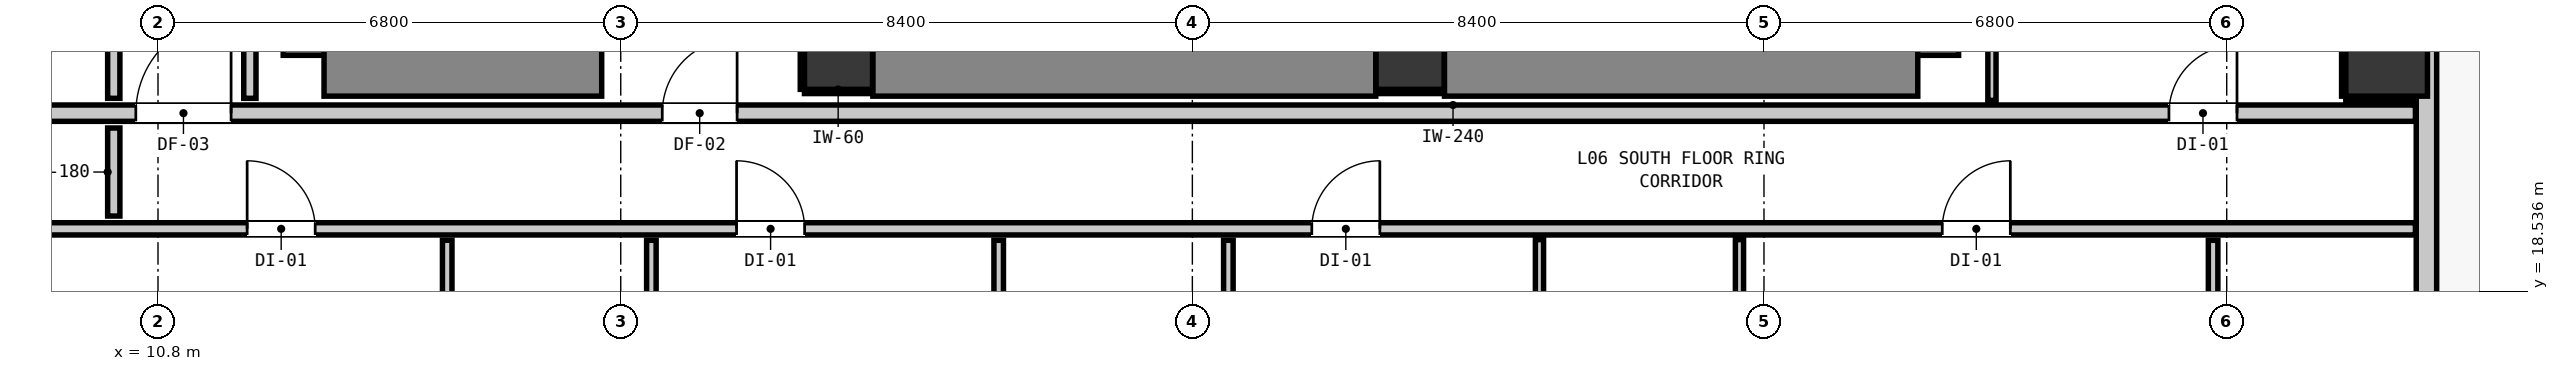
"""IFC4 building model, lengths in metres.
Left out: names, types, materials, properties, quantities, classifications, styles, units other than length and angle.
Written with IfcOpenShell. Run it as: python <this file> out.ifc"""

import sys

from ifc_helpers import new_model, si_unit, direction, frame, frame_2d, origin, origin_2d, place, context, subcontext, project, spatial, rectangle, extrude, element, fill, save


model = new_model("IFC4")
c1 = context("Model", 3, precision=1e-05, world=origin(), true_north=direction((0.0, 1.0)))
c2 = subcontext(c1, "Body", "Model", "MODEL_VIEW")
j1 = project(units=[si_unit("LENGTHUNIT", "METRE"), si_unit("PLANEANGLEUNIT", "RADIAN")], contexts=[c1])
p1 = place(None, origin())
s1 = spatial("IfcSite", under=j1, at=p1, CompositionType="ELEMENT")
p2 = place(p1, origin())
s2 = spatial("IfcBuilding", under=s1, at=p2, CompositionType="ELEMENT")
p3 = place(p2, frame((0.0, 0.0, 25.32)))
s3 = spatial("IfcBuildingStorey", under=s2, at=p3, CompositionType="ELEMENT", Elevation=25.32)
for number, where, z_axis, x_axis in (
    (1, (20.8, 22.0, 0.0), (0.0, 0.0, 1.0), (1.0, 0.0, 0.0)),
    (2, (29.2, 22.0, 0.0), (0.0, 0.0, 1.0), (1.0, 0.0, 0.0)),
):
    element("IfcColumn", number, at=place(p3, frame(where, z_axis=z_axis, x_axis=x_axis)), inside=s3, PredefinedType="COLUMN", context=c2, shape_type="SweptSolid", body=[
        extrude(rectangle(XDim=1.0, YDim=1.0, at=origin_2d()), origin(), (0.0, 0.0, 1.0), 3.32),
    ])
p4 = place(p3, frame((13.24, 22.0, 0.0), z_axis=(0.0, 0.0, 1.0), x_axis=(0.0, 1.0, 0.0)))
e3 = element("IfcWall", 3, at=p4, inside=s3, PredefinedType="SHEAR", context=c2, shape_type="SweptSolid", body=[
    extrude(rectangle(XDim=8.195, YDim=1.2, at=frame_2d((4.098, 0.0))), origin(), (0.0, 0.0, 1.0), 3.32),
])
p5 = place(p3, frame((13.24, 22.0, 0.0), z_axis=(0.0, 0.0, 1.0), x_axis=(1.0, 0.0, 0.0)))
e4 = element("IfcWall", 4, at=p5, inside=s3, PredefinedType="SHEAR", context=c2, shape_type="SweptSolid", body=[
    extrude(rectangle(XDim=4.08, YDim=1.2, at=frame_2d((2.04, 0.0))), origin(), (0.0, 0.0, 1.0), 3.32),
])
p6 = place(p3, frame((36.66, 22.0, 0.0), z_axis=(0.0, 0.0, 1.0), x_axis=(0.0, 1.0, 0.0)))
e5 = element("IfcWall", 5, at=p6, inside=s3, PredefinedType="SHEAR", context=c2, shape_type="SweptSolid", body=[
    extrude(rectangle(XDim=8.195, YDim=1.2, at=frame_2d((4.098, 0.0))), origin(), (0.0, 0.0, 1.0), 3.32),
])
p7 = place(p3, frame((29.705, 22.0, 0.0), z_axis=(0.0, 0.0, 1.0), x_axis=(1.0, 0.0, 0.0)))
e6 = element("IfcWall", 6, at=p7, inside=s3, PredefinedType="SHEAR", context=c2, shape_type="SweptSolid", body=[
    extrude(rectangle(XDim=6.955, YDim=1.2, at=frame_2d((3.478, 0.0))), origin(), (0.0, 0.0, 1.0), 3.32),
])
p8 = place(p3, frame((21.305, 22.0, 0.0), z_axis=(0.0, 0.0, 1.0), x_axis=(1.0, 0.0, 0.0)))
e7 = element("IfcWall", 7, at=p8, inside=s3, PredefinedType="SHEAR", context=c2, shape_type="SweptSolid", body=[
    extrude(rectangle(XDim=7.39, YDim=1.2, at=frame_2d((3.695, 0.0))), origin(), (0.0, 0.0, 1.0), 3.32),
])
p9 = place(p3, frame((43.55, 22.0, 0.0), z_axis=(0.0, 0.0, 1.0), x_axis=(1.0, 0.0, 0.0)))
e8 = element("IfcColumn", 8, at=p9, inside=s3, PredefinedType="COLUMN", context=c2, shape_type="SweptSolid", body=[
    extrude(rectangle(XDim=1.2, YDim=1.2, at=origin_2d()), origin(), (0.0, 0.0, 1.0), 3.32),
])
p10 = place(p3, frame((44.135, 44.835, 0.0), z_axis=(0.0, 0.0, 1.0), x_axis=(0.0, -1.0, 0.0)))
e9 = element("IfcWall", 9, at=p10, inside=s3, PredefinedType="STANDARD", context=c2, shape_type="SweptSolid", body=[
    extrude(rectangle(XDim=34.67, YDim=0.3, at=frame_2d((17.335, 0.0))), origin(), (0.0, 0.0, 1.0), 3.06),
])
p11 = place(p10, frame((0.901, 0.0, 0.0)))
e10 = element("IfcOpeningElement", 10, at=p11, cuts=e9, PredefinedType="OPENING", context=c2, shape_type="SweptSolid", body=[
    extrude(rectangle(XDim=1.0, YDim=2.15, at=frame_2d((0.5, 1.075))), frame((0.0, 0.16, 0.0), z_axis=(0.0, -1.0, 0.0), x_axis=(1.0, 0.0, 0.0)), (0.0, 0.0, 1.0), 0.32),
])
p12 = place(p10, frame((19.91, 0.0, 0.85)))
e11 = element("IfcOpeningElement", 11, at=p12, cuts=e9, PredefinedType="OPENING", context=c2, shape_type="SweptSolid", body=[
    extrude(rectangle(XDim=1.65, YDim=1.75, at=frame_2d((0.825, 0.875))), frame((0.0, 0.16, 0.0), z_axis=(0.0, -1.0, 0.0), x_axis=(1.0, 0.0, 0.0)), (0.0, 0.0, 1.0), 0.32),
])
p13 = place(p10, frame((7.126, 0.0, 0.85)))
e12 = element("IfcOpeningElement", 12, at=p13, cuts=e9, PredefinedType="OPENING", context=c2, shape_type="SweptSolid", body=[
    extrude(rectangle(XDim=1.65, YDim=1.75, at=frame_2d((0.825, 0.875))), frame((0.0, 0.16, 0.0), z_axis=(0.0, -1.0, 0.0), x_axis=(1.0, 0.0, 0.0)), (0.0, 0.0, 1.0), 0.32),
])
p14 = place(p3, frame((1.827, 21.15, 0.0), z_axis=(0.0, 0.0, 1.0), x_axis=(1.0, 0.0, 0.0)))
e13 = element("IfcWall", 13, at=p14, inside=s3, PredefinedType="PARTITIONING", context=c2, shape_type="SweptSolid", body=[
    extrude(rectangle(XDim=42.146, YDim=0.24, at=frame_2d((21.073, 0.0))), origin(), (0.0, 0.0, 1.0), 3.06),
])
p15 = place(p14, frame((16.383, 0.0, 0.0)))
e14 = element("IfcOpeningElement", 14, at=p15, cuts=e13, PredefinedType="OPENING", context=c2, shape_type="SweptSolid", body=[
    extrude(rectangle(XDim=1.1, YDim=2.15, at=frame_2d((0.55, 1.075))), frame((0.0, 0.13, 0.0), z_axis=(0.0, -1.0, 0.0), x_axis=(1.0, 0.0, 0.0)), (0.0, 0.0, 1.0), 0.26),
])
p16 = place(p14, frame((8.647, 0.0, 0.0)))
e15 = element("IfcOpeningElement", 15, at=p16, cuts=e13, PredefinedType="OPENING", context=c2, shape_type="SweptSolid", body=[
    extrude(rectangle(XDim=1.4, YDim=2.15, at=frame_2d((0.7, 1.075))), frame((0.0, 0.13, 0.0), z_axis=(0.0, -1.0, 0.0), x_axis=(1.0, 0.0, 0.0)), (0.0, 0.0, 1.0), 0.26),
])
p17 = place(p14, frame((38.524, 0.0, 0.0)))
e16 = element("IfcOpeningElement", 16, at=p17, cuts=e13, PredefinedType="OPENING", context=c2, shape_type="SweptSolid", body=[
    extrude(rectangle(XDim=1.0, YDim=2.15, at=frame_2d((0.5, 1.075))), frame((0.0, 0.13, 0.0), z_axis=(0.0, -1.0, 0.0), x_axis=(1.0, 0.0, 0.0)), (0.0, 0.0, 1.0), 0.26),
])
p18 = place(p3, frame((1.827, 19.45, 0.0), z_axis=(0.0, 0.0, 1.0), x_axis=(1.0, 0.0, 0.0)))
e17 = element("IfcWall", 17, at=p18, inside=s3, PredefinedType="PARTITIONING", context=c2, shape_type="SweptSolid", body=[
    extrude(rectangle(XDim=42.146, YDim=0.18, at=frame_2d((21.073, 0.0))), origin(), (0.0, 0.0, 1.0), 3.06),
])
p19 = place(p18, frame((10.283, 0.0, 0.0)))
e18 = element("IfcOpeningElement", 18, at=p19, cuts=e17, PredefinedType="OPENING", context=c2, shape_type="SweptSolid", body=[
    extrude(rectangle(XDim=1.0, YDim=2.15, at=frame_2d((0.5, 1.075))), frame((0.0, 0.1, 0.0), z_axis=(0.0, -1.0, 0.0), x_axis=(1.0, 0.0, 0.0)), (0.0, 0.0, 1.0), 0.2),
])
p20 = place(p18, frame((17.475, 0.0, 0.0)))
e19 = element("IfcOpeningElement", 19, at=p20, cuts=e17, PredefinedType="OPENING", context=c2, shape_type="SweptSolid", body=[
    extrude(rectangle(XDim=1.0, YDim=2.15, at=frame_2d((0.5, 1.075))), frame((0.0, 0.1, 0.0), z_axis=(0.0, -1.0, 0.0), x_axis=(1.0, 0.0, 0.0)), (0.0, 0.0, 1.0), 0.2),
])
p21 = place(p18, frame((25.928, 0.0, 0.0)))
e20 = element("IfcOpeningElement", 20, at=p21, cuts=e17, PredefinedType="OPENING", context=c2, shape_type="SweptSolid", body=[
    extrude(rectangle(XDim=1.0, YDim=2.15, at=frame_2d((0.5, 1.075))), frame((0.0, 0.1, 0.0), z_axis=(0.0, -1.0, 0.0), x_axis=(1.0, 0.0, 0.0)), (0.0, 0.0, 1.0), 0.2),
])
p22 = place(p18, frame((35.193, 0.0, 0.0)))
e21 = element("IfcOpeningElement", 21, at=p22, cuts=e17, PredefinedType="OPENING", context=c2, shape_type="SweptSolid", body=[
    extrude(rectangle(XDim=1.0, YDim=2.15, at=frame_2d((0.5, 1.075))), frame((0.0, 0.1, 0.0), z_axis=(0.0, -1.0, 0.0), x_axis=(1.0, 0.0, 0.0)), (0.0, 0.0, 1.0), 0.2),
])
p23 = place(p3, frame((10.15, 19.638, 0.0), z_axis=(0.0, 0.0, 1.0), x_axis=(0.0, 1.0, 0.0)))
e22 = element("IfcWall", 22, at=p23, inside=s3, PredefinedType="PARTITIONING", context=c2, shape_type="SweptSolid", body=[
    extrude(rectangle(XDim=1.294, YDim=0.18, at=frame_2d((0.647, 0.0))), origin(), (0.0, 0.0, 1.0), 3.06),
])
p24 = place(p3, frame((10.15, 21.368, 0.0), z_axis=(0.0, 0.0, 1.0), x_axis=(0.0, 1.0, 0.0)))
e23 = element("IfcWall", 23, at=p24, inside=s3, PredefinedType="PARTITIONING", context=c2, shape_type="SweptSolid", body=[
    extrude(rectangle(XDim=2.074, YDim=0.18, at=frame_2d((1.037, 0.0))), origin(), (0.0, 0.0, 1.0), 3.06),
])
p25 = place(p3, frame((12.15, 21.368, 0.0), z_axis=(0.0, 0.0, 1.0), x_axis=(0.0, 1.0, 0.0)))
e24 = element("IfcWall", 24, at=p25, inside=s3, PredefinedType="PARTITIONING", context=c2, shape_type="SweptSolid", body=[
    extrude(rectangle(XDim=18.694, YDim=0.18, at=frame_2d((9.347, 0.0))), origin(), (0.0, 0.0, 1.0), 3.06),
])
p26 = place(p3, frame((15.05, 13.148, 0.0), z_axis=(0.0, 0.0, 1.0), x_axis=(0.0, 1.0, 0.0)))
e25 = element("IfcWall", 25, at=p26, inside=s3, PredefinedType="PARTITIONING", context=c2, shape_type="SweptSolid", body=[
    extrude(rectangle(XDim=6.134, YDim=0.14, at=frame_2d((3.067, 0.0))), origin(), (0.0, 0.0, 1.0), 3.06),
])
p27 = place(p3, frame((18.05, 13.148, 0.0), z_axis=(0.0, 0.0, 1.0), x_axis=(0.0, 1.0, 0.0)))
e26 = element("IfcWall", 26, at=p27, inside=s3, PredefinedType="PARTITIONING", context=c2, shape_type="SweptSolid", body=[
    extrude(rectangle(XDim=6.134, YDim=0.14, at=frame_2d((3.067, 0.0))), origin(), (0.0, 0.0, 1.0), 3.06),
])
p28 = place(p27, frame((2.614, 0.0, 0.0)))
e27 = element("IfcOpeningElement", 27, at=p28, cuts=e26, PredefinedType="OPENING", context=c2, shape_type="SweptSolid", body=[
    extrude(rectangle(XDim=0.9, YDim=2.1, at=frame_2d((0.45, 1.05))), frame((0.0, 0.08, 0.0), z_axis=(0.0, -1.0, 0.0), x_axis=(1.0, 0.0, 0.0)), (0.0, 0.0, 1.0), 0.16),
])
p29 = place(p3, frame((23.154, 13.148, 0.0), z_axis=(0.0, 0.0, 1.0), x_axis=(0.0, 1.0, 0.0)))
e28 = element("IfcWall", 28, at=p29, inside=s3, PredefinedType="PARTITIONING", context=c2, shape_type="SweptSolid", body=[
    extrude(rectangle(XDim=6.134, YDim=0.14, at=frame_2d((3.067, 0.0))), origin(), (0.0, 0.0, 1.0), 3.06),
])
p30 = place(p3, frame((26.529, 13.148, 0.0), z_axis=(0.0, 0.0, 1.0), x_axis=(0.0, 1.0, 0.0)))
e29 = element("IfcWall", 29, at=p30, inside=s3, PredefinedType="PARTITIONING", context=c2, shape_type="SweptSolid", body=[
    extrude(rectangle(XDim=6.134, YDim=0.14, at=frame_2d((3.067, 0.0))), origin(), (0.0, 0.0, 1.0), 3.06),
])
p31 = place(p30, frame((2.634, 0.0, 0.0)))
e30 = element("IfcOpeningElement", 30, at=p31, cuts=e29, PredefinedType="OPENING", context=c2, shape_type="SweptSolid", body=[
    extrude(rectangle(XDim=0.86, YDim=2.02, at=frame_2d((0.43, 1.01))), frame((0.0, 0.08, 0.0), z_axis=(0.0, -1.0, 0.0), x_axis=(1.0, 0.0, 0.0)), (0.0, 0.0, 1.0), 0.16),
])
p32 = place(p3, frame((41.0, 13.148, 0.0), z_axis=(0.0, 0.0, 1.0), x_axis=(0.0, 1.0, 0.0)))
e31 = element("IfcWall", 31, at=p32, inside=s3, PredefinedType="PARTITIONING", context=c2, shape_type="SweptSolid", body=[
    extrude(rectangle(XDim=6.134, YDim=0.14, at=frame_2d((3.067, 0.0))), origin(), (0.0, 0.0, 1.0), 2.445),
])
p33 = place(p32, frame((2.614, 0.0, 0.0)))
e32 = element("IfcOpeningElement", 32, at=p33, cuts=e31, PredefinedType="OPENING", context=c2, shape_type="SweptSolid", body=[
    extrude(rectangle(XDim=0.9, YDim=2.1, at=frame_2d((0.45, 1.05))), frame((0.0, 0.08, 0.0), z_axis=(0.0, -1.0, 0.0), x_axis=(1.0, 0.0, 0.0)), (0.0, 0.0, 1.0), 0.16),
])
p34 = place(p3, frame((31.101, 7.827, 0.0), z_axis=(0.0, 0.0, 1.0), x_axis=(0.0, 1.0, 0.0)))
e33 = element("IfcWall", 33, at=p34, inside=s3, PredefinedType="PARTITIONING", context=c2, shape_type="SweptSolid", body=[
    extrude(rectangle(XDim=11.465, YDim=0.12, at=frame_2d((5.732, 0.0))), origin(), (0.0, 0.0, 1.0), 3.06),
])
p35 = place(p34, frame((5.348, 0.0, 0.0)))
e34 = element("IfcOpeningElement", 34, at=p35, cuts=e33, PredefinedType="OPENING", context=c2, shape_type="SweptSolid", body=[
    extrude(rectangle(XDim=0.9, YDim=2.1, at=frame_2d((0.45, 1.05))), frame((0.0, 0.07, 0.0), z_axis=(0.0, -1.0, 0.0), x_axis=(1.0, 0.0, 0.0)), (0.0, 0.0, 1.0), 0.14),
])
p36 = place(p3, frame((34.04, 7.827, 0.0), z_axis=(0.0, 0.0, 1.0), x_axis=(0.0, 1.0, 0.0)))
e35 = element("IfcWall", 35, at=p36, inside=s3, PredefinedType="PARTITIONING", context=c2, shape_type="SweptSolid", body=[
    extrude(rectangle(XDim=11.465, YDim=0.12, at=frame_2d((5.732, 0.0))), origin(), (0.0, 0.0, 1.0), 3.06),
])
p37 = place(p3, frame((37.75, 21.338, 0.0), z_axis=(0.0, 0.0, 1.0), x_axis=(0.0, 1.0, 0.0)))
e36 = element("IfcWall", 36, at=p37, inside=s3, PredefinedType="PARTITIONING", context=c2, shape_type="SweptSolid", body=[
    extrude(rectangle(XDim=4.024, YDim=0.12, at=frame_2d((2.012, 0.0))), origin(), (0.0, 0.0, 1.0), 3.06),
])
p38 = place(p3, frame((20.3, 21.468, 0.0), z_axis=(0.0, 0.0, 1.0), x_axis=(1.0, 0.0, 0.0)))
e37 = element("IfcWall", 37, at=p38, inside=s3, PredefinedType="PARTITIONING", context=c2, shape_type="SweptSolid", body=[
    extrude(rectangle(XDim=0.99, YDim=0.06, at=frame_2d((0.495, 0.0))), origin(), (0.0, 0.0, 1.0), 1.45),
])
p39 = place(p3, frame((20.268, 21.5, 0.0), z_axis=(0.0, 0.0, 1.0), x_axis=(0.0, 1.0, 0.0)))
e38 = element("IfcWall", 38, at=p39, inside=s3, PredefinedType="PARTITIONING", context=c2, shape_type="SweptSolid", body=[
    extrude(rectangle(XDim=1.0, YDim=0.06, at=frame_2d((0.5, 0.0))), origin(), (0.0, 0.0, 1.0), 1.45),
])
p40 = place(p3, frame((28.71, 21.468, 0.0), z_axis=(0.0, 0.0, 1.0), x_axis=(1.0, 0.0, 0.0)))
e39 = element("IfcWall", 39, at=p40, inside=s3, PredefinedType="PARTITIONING", context=c2, shape_type="SweptSolid", body=[
    extrude(rectangle(XDim=0.98, YDim=0.06, at=frame_2d((0.49, 0.0))), origin(), (0.0, 0.0, 1.0), 1.45),
])
p41 = place(p3, frame((42.95, 21.368, 0.0), z_axis=(0.0, 0.0, 1.0), x_axis=(1.0, 0.0, 0.0)))
e40 = element("IfcWall", 40, at=p41, inside=s3, PredefinedType="PARTITIONING", context=c2, shape_type="SweptSolid", body=[
    extrude(rectangle(XDim=1.02, YDim=0.06, at=frame_2d((0.51, 0.0))), origin(), (0.0, 0.0, 1.0), 1.45),
])
p42 = place(p3, frame((42.918, 21.4, 0.0), z_axis=(0.0, 0.0, 1.0), x_axis=(0.0, 1.0, 0.0)))
e41 = element("IfcWall", 41, at=p42, inside=s3, PredefinedType="PARTITIONING", context=c2, shape_type="SweptSolid", body=[
    extrude(rectangle(XDim=1.2, YDim=0.06, at=frame_2d((0.6, 0.0))), origin(), (0.0, 0.0, 1.0), 1.45),
])
p43 = place(p15, origin())
e42 = element("IfcDoor", 42, at=p43, inside=s3, OperationType="SINGLE_SWING_RIGHT", PredefinedType="DOOR", context=c2, shape_type="SweptSolid", body=[
    extrude(rectangle(XDim=1.1, YDim=2.15, at=frame_2d((0.55, 1.075))), frame((0.0, 0.025, 0.0), z_axis=(0.0, -1.0, 0.0), x_axis=(1.0, 0.0, 0.0)), (0.0, 0.0, 1.0), 0.05),
])
fill(e14, e42)
p44 = place(p16, origin())
e43 = element("IfcDoor", 43, at=p44, inside=s3, OperationType="SINGLE_SWING_RIGHT", PredefinedType="DOOR", context=c2, shape_type="SweptSolid", body=[
    extrude(rectangle(XDim=1.4, YDim=2.15, at=frame_2d((0.7, 1.075))), frame((0.0, 0.025, 0.0), z_axis=(0.0, -1.0, 0.0), x_axis=(1.0, 0.0, 0.0)), (0.0, 0.0, 1.0), 0.05),
])
fill(e15, e43)
p45 = place(p19, origin())
e44 = element("IfcDoor", 44, at=p45, inside=s3, OperationType="SINGLE_SWING_LEFT", PredefinedType="DOOR", context=c2, shape_type="SweptSolid", body=[
    extrude(rectangle(XDim=1.0, YDim=2.15, at=frame_2d((0.5, 1.075))), frame((0.0, 0.025, 0.0), z_axis=(0.0, -1.0, 0.0), x_axis=(1.0, 0.0, 0.0)), (0.0, 0.0, 1.0), 0.05),
])
fill(e18, e44)
p46 = place(p20, origin())
e45 = element("IfcDoor", 45, at=p46, inside=s3, OperationType="SINGLE_SWING_LEFT", PredefinedType="DOOR", context=c2, shape_type="SweptSolid", body=[
    extrude(rectangle(XDim=1.0, YDim=2.15, at=frame_2d((0.5, 1.075))), frame((0.0, 0.025, 0.0), z_axis=(0.0, -1.0, 0.0), x_axis=(1.0, 0.0, 0.0)), (0.0, 0.0, 1.0), 0.05),
])
fill(e19, e45)
p47 = place(p21, origin())
e46 = element("IfcDoor", 46, at=p47, inside=s3, OperationType="SINGLE_SWING_RIGHT", PredefinedType="DOOR", context=c2, shape_type="SweptSolid", body=[
    extrude(rectangle(XDim=1.0, YDim=2.15, at=frame_2d((0.5, 1.075))), frame((0.0, 0.025, 0.0), z_axis=(0.0, -1.0, 0.0), x_axis=(1.0, 0.0, 0.0)), (0.0, 0.0, 1.0), 0.05),
])
fill(e20, e46)
p48 = place(p22, origin())
e47 = element("IfcDoor", 47, at=p48, inside=s3, OperationType="SINGLE_SWING_RIGHT", PredefinedType="DOOR", context=c2, shape_type="SweptSolid", body=[
    extrude(rectangle(XDim=1.0, YDim=2.15, at=frame_2d((0.5, 1.075))), frame((0.0, 0.025, 0.0), z_axis=(0.0, -1.0, 0.0), x_axis=(1.0, 0.0, 0.0)), (0.0, 0.0, 1.0), 0.05),
])
fill(e21, e47)
p49 = place(p17, origin())
e48 = element("IfcDoor", 48, at=p49, inside=s3, OperationType="SINGLE_SWING_RIGHT", PredefinedType="DOOR", context=c2, shape_type="SweptSolid", body=[
    extrude(rectangle(XDim=1.0, YDim=2.15, at=frame_2d((0.5, 1.075))), frame((0.0, 0.025, 0.0), z_axis=(0.0, -1.0, 0.0), x_axis=(1.0, 0.0, 0.0)), (0.0, 0.0, 1.0), 0.05),
])
fill(e16, e48)
save(model, sys.argv[1])
